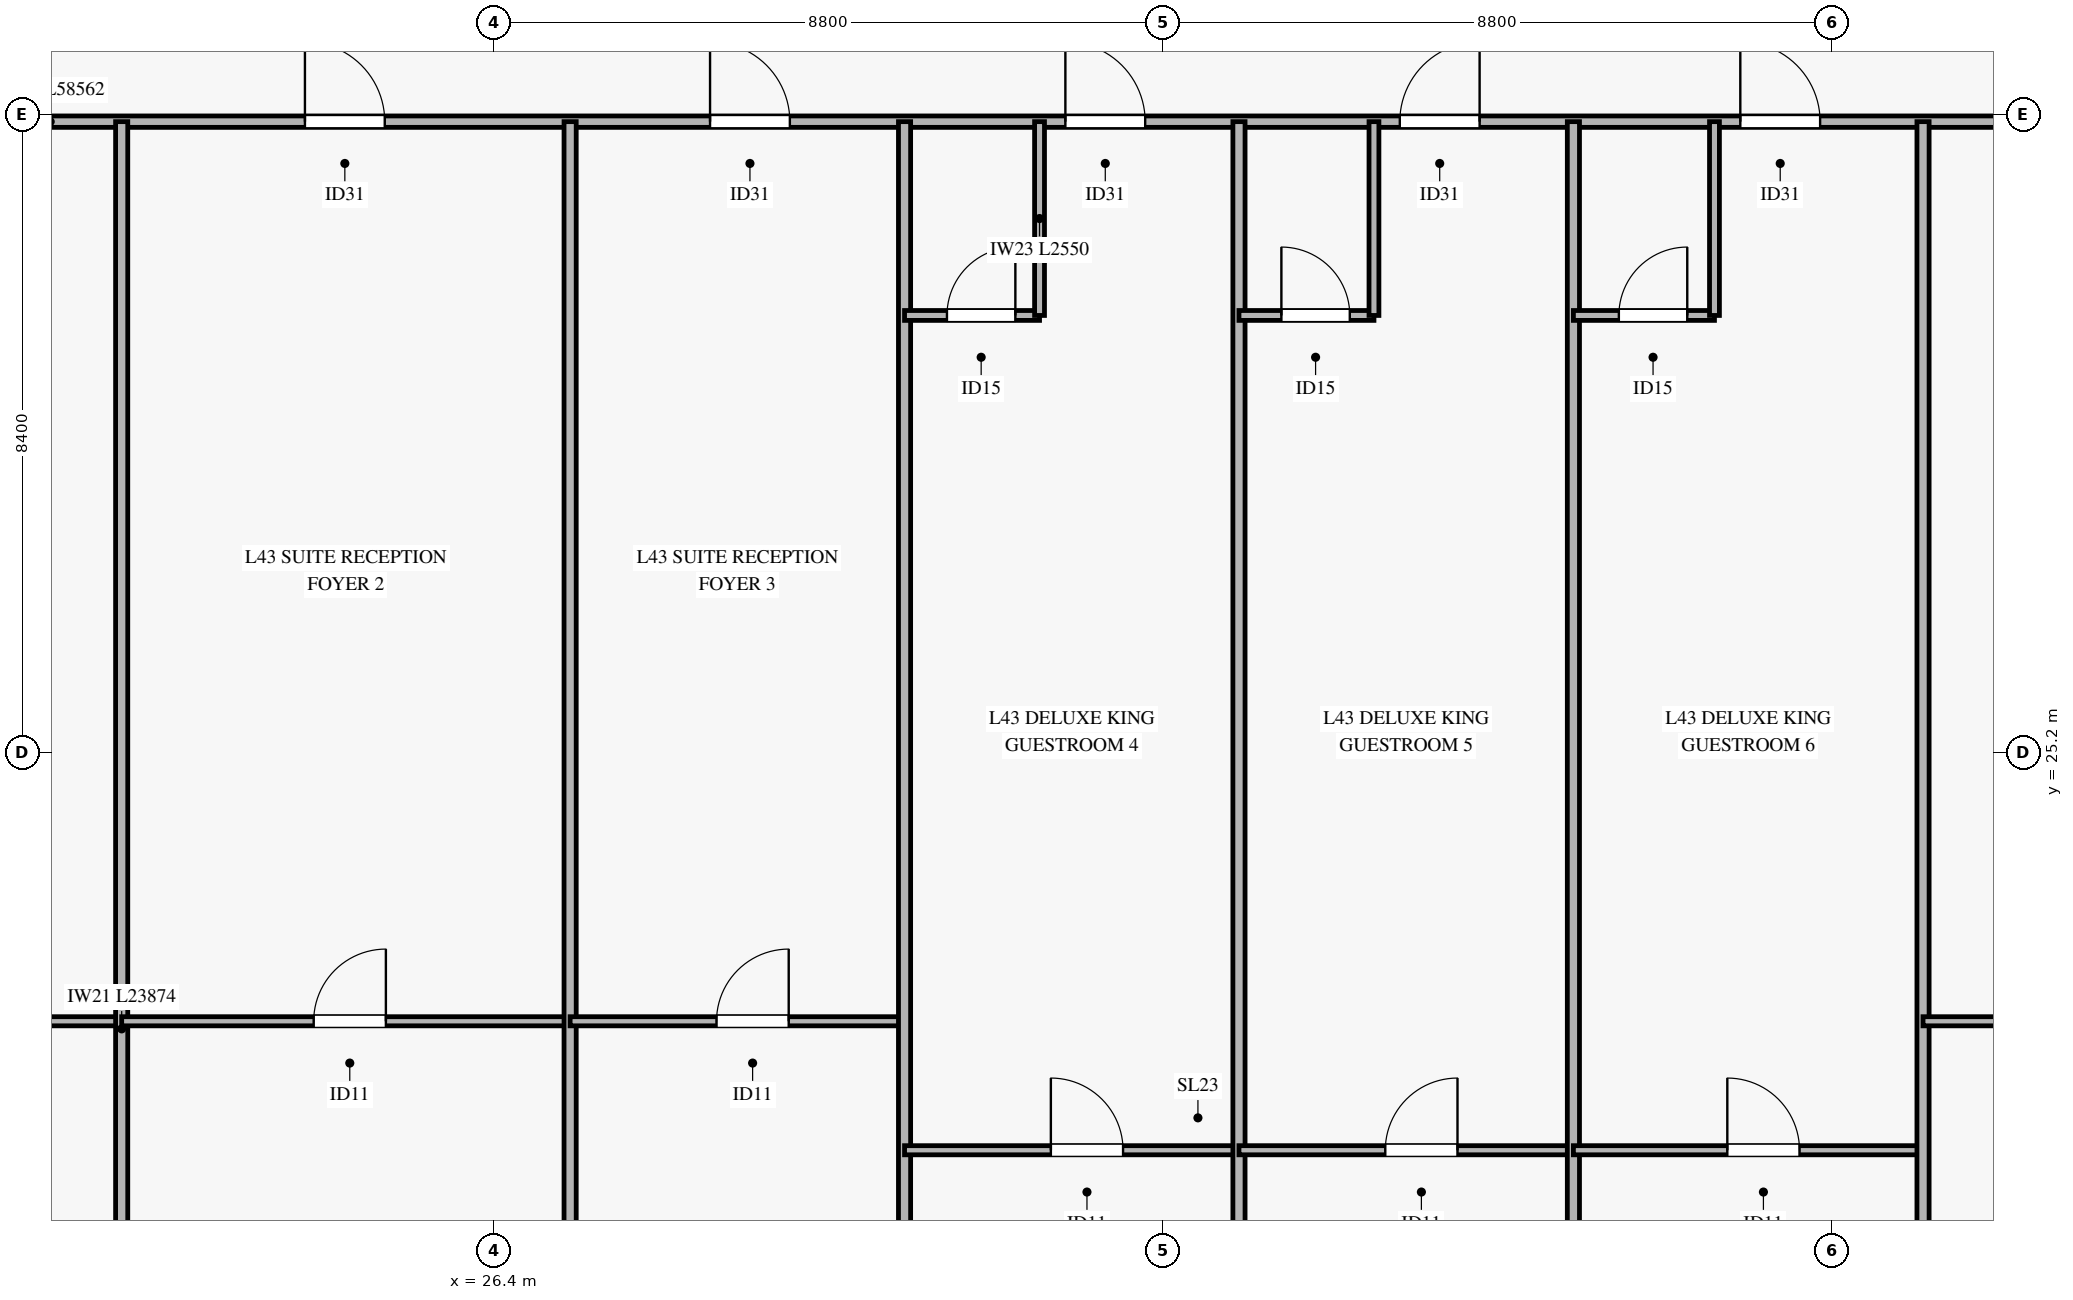
"""IFC4 building model, lengths in metres.
Left out: names, types, materials, properties, quantities, classifications, styles, units other than length and angle.
Written with IfcOpenShell. Run it as: python <this file> out.ifc"""

import sys

from ifc_helpers import new_model, si_unit, direction, frame, frame_2d, origin, place, context, subcontext, project, spatial, rectangle, extrude, source, transform, mapped, element, fill, save


model = new_model("IFC4")
c1 = context("Model", 3, precision=1e-05, world=origin(), true_north=direction((0.0, 1.0)))
c2 = subcontext(c1, "Body", "Model", "MODEL_VIEW")
j1 = project(units=[si_unit("LENGTHUNIT", "METRE"), si_unit("PLANEANGLEUNIT", "RADIAN")], contexts=[c1])
p1 = place(None, origin())
s1 = spatial("IfcSite", under=j1, at=p1, CompositionType="ELEMENT")
p2 = place(p1, origin())
s2 = spatial("IfcBuilding", under=s1, at=p2, CompositionType="ELEMENT")
p3 = place(p2, frame((0.0, 0.0, 173.7)))
s3 = spatial("IfcBuildingStorey", under=s2, at=p3, CompositionType="ELEMENT", Elevation=173.7)
p4 = place(p3, frame((5.919, 33.5, 0.0), z_axis=(0.0, 0.0, 1.0), x_axis=(1.0, 0.0, 0.0)))
e1 = element("IfcWall", 1, at=p4, inside=s3, PredefinedType="PARTITIONING", context=c2, shape_type="SweptSolid", body=[
    extrude(rectangle(XDim=58.562, YDim=0.15, at=frame_2d((29.281, 0.0))), origin(), (0.0, 0.0, 1.0), 2.455),
])
p5 = place(p4, frame((6.214, 0.0, 0.0)))
e2 = element("IfcOpeningElement", 2, at=p5, cuts=e1, PredefinedType="OPENING", context=c2, shape_type="SweptSolid", body=[
    extrude(rectangle(XDim=1.05, YDim=2.15, at=frame_2d((0.525, 1.075))), frame((0.0, 0.085, 0.0), z_axis=(0.0, -1.0, 0.0), x_axis=(1.0, 0.0, 0.0)), (0.0, 0.0, 1.0), 0.17),
])
p6 = place(p4, frame((17.992, 0.0, 0.0)))
e3 = element("IfcOpeningElement", 3, at=p6, cuts=e1, PredefinedType="OPENING", context=c2, shape_type="SweptSolid", body=[
    extrude(rectangle(XDim=1.05, YDim=2.15, at=frame_2d((0.525, 1.075))), frame((0.0, 0.085, 0.0), z_axis=(0.0, -1.0, 0.0), x_axis=(1.0, 0.0, 0.0)), (0.0, 0.0, 1.0), 0.17),
])
p7 = place(p4, frame((23.322, 0.0, 0.0)))
e4 = element("IfcOpeningElement", 4, at=p7, cuts=e1, PredefinedType="OPENING", context=c2, shape_type="SweptSolid", body=[
    extrude(rectangle(XDim=1.05, YDim=2.15, at=frame_2d((0.525, 1.075))), frame((0.0, 0.085, 0.0), z_axis=(0.0, -1.0, 0.0), x_axis=(1.0, 0.0, 0.0)), (0.0, 0.0, 1.0), 0.17),
])
p8 = place(p4, frame((27.997, 0.0, 0.0)))
e5 = element("IfcOpeningElement", 5, at=p8, cuts=e1, PredefinedType="OPENING", context=c2, shape_type="SweptSolid", body=[
    extrude(rectangle(XDim=1.05, YDim=2.15, at=frame_2d((0.525, 1.075))), frame((0.0, 0.085, 0.0), z_axis=(0.0, -1.0, 0.0), x_axis=(1.0, 0.0, 0.0)), (0.0, 0.0, 1.0), 0.17),
])
p9 = place(p4, frame((32.397, 0.0, 0.0)))
e6 = element("IfcOpeningElement", 6, at=p9, cuts=e1, PredefinedType="OPENING", context=c2, shape_type="SweptSolid", body=[
    extrude(rectangle(XDim=1.05, YDim=2.15, at=frame_2d((0.525, 1.075))), frame((0.0, 0.085, 0.0), z_axis=(0.0, -1.0, 0.0), x_axis=(1.0, 0.0, 0.0)), (0.0, 0.0, 1.0), 0.17),
])
p10 = place(p4, frame((36.877, 0.0, 0.0)))
e7 = element("IfcOpeningElement", 7, at=p10, cuts=e1, PredefinedType="OPENING", context=c2, shape_type="SweptSolid", body=[
    extrude(rectangle(XDim=1.05, YDim=2.15, at=frame_2d((0.525, 1.075))), frame((0.0, 0.085, 0.0), z_axis=(0.0, -1.0, 0.0), x_axis=(1.0, 0.0, 0.0)), (0.0, 0.0, 1.0), 0.17),
])
p11 = place(p4, frame((46.701, 0.0, 0.0)))
e8 = element("IfcOpeningElement", 8, at=p11, cuts=e1, PredefinedType="OPENING", context=c2, shape_type="SweptSolid", body=[
    extrude(rectangle(XDim=1.05, YDim=2.15, at=frame_2d((0.525, 1.075))), frame((0.0, 0.085, 0.0), z_axis=(0.0, -1.0, 0.0), x_axis=(1.0, 0.0, 0.0)), (0.0, 0.0, 1.0), 0.17),
])
p12 = place(p3, frame((5.919, 21.663, 0.0), z_axis=(0.0, 0.0, 1.0), x_axis=(1.0, 0.0, 0.0)))
e9 = element("IfcWall", 9, at=p12, inside=s3, PredefinedType="PARTITIONING", context=c2, shape_type="SweptSolid", body=[
    extrude(rectangle(XDim=15.581, YDim=0.12, at=frame_2d((7.791, 0.0))), origin(), (0.0, 0.0, 1.0), 2.455),
])
p13 = place(p12, frame((6.518, 0.0, 0.0)))
e10 = element("IfcOpeningElement", 10, at=p13, cuts=e9, PredefinedType="OPENING", context=c2, shape_type="SweptSolid", body=[
    extrude(rectangle(XDim=0.95, YDim=2.1, at=frame_2d((0.475, 1.05))), frame((0.0, 0.07, 0.0), z_axis=(0.0, -1.0, 0.0), x_axis=(1.0, 0.0, 0.0)), (0.0, 0.0, 1.0), 0.14),
])
p14 = place(p3, frame((21.5, 9.626, 0.0), z_axis=(0.0, 0.0, 1.0), x_axis=(0.0, 1.0, 0.0)))
e11 = element("IfcWall", 11, at=p14, inside=s3, PredefinedType="PARTITIONING", context=c2, shape_type="SweptSolid", body=[
    extrude(rectangle(XDim=23.874, YDim=0.16, at=frame_2d((11.937, 0.0))), origin(), (0.0, 0.0, 1.0), 2.755),
])
p15 = place(p3, frame((21.5, 21.663, 0.0), z_axis=(0.0, 0.0, 1.0), x_axis=(1.0, 0.0, 0.0)))
e12 = element("IfcWall", 12, at=p15, inside=s3, PredefinedType="PARTITIONING", context=c2, shape_type="SweptSolid", body=[
    extrude(rectangle(XDim=5.9, YDim=0.12, at=frame_2d((2.95, 0.0))), origin(), (0.0, 0.0, 1.0), 3.27),
])
p16 = place(p15, frame((2.526, 0.0, 0.0)))
e13 = element("IfcOpeningElement", 13, at=p16, cuts=e12, PredefinedType="OPENING", context=c2, shape_type="SweptSolid", body=[
    extrude(rectangle(XDim=0.95, YDim=2.1, at=frame_2d((0.475, 1.05))), frame((0.0, 0.07, 0.0), z_axis=(0.0, -1.0, 0.0), x_axis=(1.0, 0.0, 0.0)), (0.0, 0.0, 1.0), 0.14),
])
p17 = place(p3, frame((27.4, 9.626, 0.0), z_axis=(0.0, 0.0, 1.0), x_axis=(0.0, 1.0, 0.0)))
e14 = element("IfcWall", 14, at=p17, inside=s3, PredefinedType="PARTITIONING", context=c2, shape_type="SweptSolid", body=[
    extrude(rectangle(XDim=23.874, YDim=0.16, at=frame_2d((11.937, 0.0))), origin(), (0.0, 0.0, 1.0), 2.755),
])
p18 = place(p3, frame((27.4, 21.663, 0.0), z_axis=(0.0, 0.0, 1.0), x_axis=(1.0, 0.0, 0.0)))
e15 = element("IfcWall", 15, at=p18, inside=s3, PredefinedType="PARTITIONING", context=c2, shape_type="SweptSolid", body=[
    extrude(rectangle(XDim=4.4, YDim=0.12, at=frame_2d((2.2, 0.0))), origin(), (0.0, 0.0, 1.0), 2.455),
])
p19 = place(p18, frame((1.926, 0.0, 0.0)))
e16 = element("IfcOpeningElement", 16, at=p19, cuts=e15, PredefinedType="OPENING", context=c2, shape_type="SweptSolid", body=[
    extrude(rectangle(XDim=0.95, YDim=2.1, at=frame_2d((0.475, 1.05))), frame((0.0, 0.07, 0.0), z_axis=(0.0, -1.0, 0.0), x_axis=(1.0, 0.0, 0.0)), (0.0, 0.0, 1.0), 0.14),
])
p20 = place(p3, frame((31.8, 9.626, 0.0), z_axis=(0.0, 0.0, 1.0), x_axis=(0.0, 1.0, 0.0)))
e17 = element("IfcWall", 17, at=p20, inside=s3, PredefinedType="PARTITIONING", context=c2, shape_type="SweptSolid", body=[
    extrude(rectangle(XDim=23.874, YDim=0.16, at=frame_2d((11.937, 0.0))), origin(), (0.0, 0.0, 1.0), 2.755),
])
p21 = place(p3, frame((31.8, 30.95, 0.0), z_axis=(0.0, 0.0, 1.0), x_axis=(1.0, 0.0, 0.0)))
e18 = element("IfcWall", 18, at=p21, inside=s3, PredefinedType="PARTITIONING", context=c2, shape_type="SweptSolid", body=[
    extrude(rectangle(XDim=1.776, YDim=0.13, at=frame_2d((0.888, 0.0))), origin(), (0.0, 0.0, 1.0), 3.27),
])
p22 = place(p21, frame((0.558, 0.0, 0.0)))
e19 = element("IfcOpeningElement", 19, at=p22, cuts=e18, PredefinedType="OPENING", context=c2, shape_type="SweptSolid", body=[
    extrude(rectangle(XDim=0.9, YDim=2.1, at=frame_2d((0.45, 1.05))), frame((0.0, 0.075, 0.0), z_axis=(0.0, -1.0, 0.0), x_axis=(1.0, 0.0, 0.0)), (0.0, 0.0, 1.0), 0.15),
])
p23 = place(p3, frame((33.576, 30.95, 0.0), z_axis=(0.0, 0.0, 1.0), x_axis=(0.0, 1.0, 0.0)))
e20 = element("IfcWall", 20, at=p23, inside=s3, PredefinedType="PARTITIONING", context=c2, shape_type="SweptSolid", body=[
    extrude(rectangle(XDim=2.55, YDim=0.13, at=frame_2d((1.275, 0.0))), origin(), (0.0, 0.0, 1.0), 2.805),
])
p24 = place(p3, frame((31.8, 19.966, 0.0), z_axis=(0.0, 0.0, 1.0), x_axis=(1.0, 0.0, 0.0)))
e21 = element("IfcWall", 21, at=p24, inside=s3, PredefinedType="PARTITIONING", context=c2, shape_type="SweptSolid", body=[
    extrude(rectangle(XDim=4.4, YDim=0.12, at=frame_2d((2.2, 0.0))), origin(), (0.0, 0.0, 1.0), 3.27),
])
p25 = place(p24, frame((1.925, 0.0, 0.0)))
e22 = element("IfcOpeningElement", 22, at=p25, cuts=e21, PredefinedType="OPENING", context=c2, shape_type="SweptSolid", body=[
    extrude(rectangle(XDim=0.95, YDim=2.1, at=frame_2d((0.475, 1.05))), frame((0.0, 0.07, 0.0), z_axis=(0.0, -1.0, 0.0), x_axis=(1.0, 0.0, 0.0)), (0.0, 0.0, 1.0), 0.14),
])
p26 = place(p3, frame((36.2, 9.626, 0.0), z_axis=(0.0, 0.0, 1.0), x_axis=(0.0, 1.0, 0.0)))
e23 = element("IfcWall", 23, at=p26, inside=s3, PredefinedType="PARTITIONING", context=c2, shape_type="SweptSolid", body=[
    extrude(rectangle(XDim=23.874, YDim=0.16, at=frame_2d((11.937, 0.0))), origin(), (0.0, 0.0, 1.0), 2.755),
])
p27 = place(p3, frame((36.2, 30.95, 0.0), z_axis=(0.0, 0.0, 1.0), x_axis=(1.0, 0.0, 0.0)))
e24 = element("IfcWall", 24, at=p27, inside=s3, PredefinedType="PARTITIONING", context=c2, shape_type="SweptSolid", body=[
    extrude(rectangle(XDim=1.776, YDim=0.13, at=frame_2d((0.888, 0.0))), origin(), (0.0, 0.0, 1.0), 2.455),
])
p28 = place(p27, frame((0.558, 0.0, 0.0)))
e25 = element("IfcOpeningElement", 25, at=p28, cuts=e24, PredefinedType="OPENING", context=c2, shape_type="SweptSolid", body=[
    extrude(rectangle(XDim=0.9, YDim=2.1, at=frame_2d((0.45, 1.05))), frame((0.0, 0.075, 0.0), z_axis=(0.0, -1.0, 0.0), x_axis=(1.0, 0.0, 0.0)), (0.0, 0.0, 1.0), 0.15),
])
p29 = place(p3, frame((37.976, 30.95, 0.0), z_axis=(0.0, 0.0, 1.0), x_axis=(0.0, 1.0, 0.0)))
e26 = element("IfcWall", 26, at=p29, inside=s3, PredefinedType="PARTITIONING", context=c2, shape_type="SweptSolid", body=[
    extrude(rectangle(XDim=2.55, YDim=0.13, at=frame_2d((1.275, 0.0))), origin(), (0.0, 0.0, 1.0), 2.805),
])
p30 = place(p3, frame((36.2, 19.966, 0.0), z_axis=(0.0, 0.0, 1.0), x_axis=(1.0, 0.0, 0.0)))
e27 = element("IfcWall", 27, at=p30, inside=s3, PredefinedType="PARTITIONING", context=c2, shape_type="SweptSolid", body=[
    extrude(rectangle(XDim=4.4, YDim=0.12, at=frame_2d((2.2, 0.0))), origin(), (0.0, 0.0, 1.0), 2.455),
])
p31 = place(p30, frame((1.925, 0.0, 0.0)))
e28 = element("IfcOpeningElement", 28, at=p31, cuts=e27, PredefinedType="OPENING", context=c2, shape_type="SweptSolid", body=[
    extrude(rectangle(XDim=0.95, YDim=2.1, at=frame_2d((0.475, 1.05))), frame((0.0, 0.07, 0.0), z_axis=(0.0, -1.0, 0.0), x_axis=(1.0, 0.0, 0.0)), (0.0, 0.0, 1.0), 0.14),
])
p32 = place(p3, frame((40.6, 9.626, 0.0), z_axis=(0.0, 0.0, 1.0), x_axis=(0.0, 1.0, 0.0)))
e29 = element("IfcWall", 29, at=p32, inside=s3, PredefinedType="PARTITIONING", context=c2, shape_type="SweptSolid", body=[
    extrude(rectangle(XDim=23.874, YDim=0.16, at=frame_2d((11.937, 0.0))), origin(), (0.0, 0.0, 1.0), 2.755),
])
p33 = place(p3, frame((40.6, 30.95, 0.0), z_axis=(0.0, 0.0, 1.0), x_axis=(1.0, 0.0, 0.0)))
e30 = element("IfcWall", 30, at=p33, inside=s3, PredefinedType="PARTITIONING", context=c2, shape_type="SweptSolid", body=[
    extrude(rectangle(XDim=1.856, YDim=0.13, at=frame_2d((0.928, 0.0))), origin(), (0.0, 0.0, 1.0), 3.27),
])
p34 = place(p33, frame((0.598, 0.0, 0.0)))
e31 = element("IfcOpeningElement", 31, at=p34, cuts=e30, PredefinedType="OPENING", context=c2, shape_type="SweptSolid", body=[
    extrude(rectangle(XDim=0.9, YDim=2.1, at=frame_2d((0.45, 1.05))), frame((0.0, 0.075, 0.0), z_axis=(0.0, -1.0, 0.0), x_axis=(1.0, 0.0, 0.0)), (0.0, 0.0, 1.0), 0.15),
])
p35 = place(p3, frame((42.456, 30.95, 0.0), z_axis=(0.0, 0.0, 1.0), x_axis=(0.0, 1.0, 0.0)))
e32 = element("IfcWall", 32, at=p35, inside=s3, PredefinedType="PARTITIONING", context=c2, shape_type="SweptSolid", body=[
    extrude(rectangle(XDim=2.55, YDim=0.13, at=frame_2d((1.275, 0.0))), origin(), (0.0, 0.0, 1.0), 2.805),
])
p36 = place(p3, frame((40.6, 19.966, 0.0), z_axis=(0.0, 0.0, 1.0), x_axis=(1.0, 0.0, 0.0)))
e33 = element("IfcWall", 33, at=p36, inside=s3, PredefinedType="PARTITIONING", context=c2, shape_type="SweptSolid", body=[
    extrude(rectangle(XDim=4.6, YDim=0.12, at=frame_2d((2.3, 0.0))), origin(), (0.0, 0.0, 1.0), 2.455),
])
p37 = place(p36, frame((2.025, 0.0, 0.0)))
e34 = element("IfcOpeningElement", 34, at=p37, cuts=e33, PredefinedType="OPENING", context=c2, shape_type="SweptSolid", body=[
    extrude(rectangle(XDim=0.95, YDim=2.1, at=frame_2d((0.475, 1.05))), frame((0.0, 0.07, 0.0), z_axis=(0.0, -1.0, 0.0), x_axis=(1.0, 0.0, 0.0)), (0.0, 0.0, 1.0), 0.14),
])
p38 = place(p3, frame((45.2, 9.626, 0.0), z_axis=(0.0, 0.0, 1.0), x_axis=(0.0, 1.0, 0.0)))
e35 = element("IfcWall", 35, at=p38, inside=s3, PredefinedType="PARTITIONING", context=c2, shape_type="SweptSolid", body=[
    extrude(rectangle(XDim=23.874, YDim=0.16, at=frame_2d((11.937, 0.0))), origin(), (0.0, 0.0, 1.0), 2.755),
])
p39 = place(p3, frame((45.2, 21.663, 0.0), z_axis=(0.0, 0.0, 1.0), x_axis=(1.0, 0.0, 0.0)))
e36 = element("IfcWall", 36, at=p39, inside=s3, PredefinedType="PARTITIONING", context=c2, shape_type="SweptSolid", body=[
    extrude(rectangle(XDim=19.281, YDim=0.12, at=frame_2d((9.641, 0.0))), origin(), (0.0, 0.0, 1.0), 2.455),
])
p40 = place(p39, frame((7.798, 0.0, 0.0)))
e37 = element("IfcOpeningElement", 37, at=p40, cuts=e36, PredefinedType="OPENING", context=c2, shape_type="SweptSolid", body=[
    extrude(rectangle(XDim=0.95, YDim=2.1, at=frame_2d((0.475, 1.05))), frame((0.0, 0.07, 0.0), z_axis=(0.0, -1.0, 0.0), x_axis=(1.0, 0.0, 0.0)), (0.0, 0.0, 1.0), 0.14),
])
m1 = source(origin(), c2, "Body", "SweptSolid", [
    extrude(rectangle(XDim=1.05, YDim=2.15, at=frame_2d((0.525, 1.075))), frame((0.0, 0.025, 0.0), z_axis=(0.0, -1.0, 0.0), x_axis=(1.0, 0.0, 0.0)), (0.0, 0.0, 1.0), 0.05),
])
p41 = place(p6, origin())
e38 = element("IfcDoor", 38, at=p41, inside=s3, OperationType="SINGLE_SWING_LEFT", PredefinedType="DOOR", context=c2, shape_type="MappedRepresentation", body=[
    mapped(m1, transform((0.0, 0.0, 0.0), x_axis=(1.0, 0.0, 0.0), y_axis=(0.0, 1.0, 0.0), z_axis=(0.0, 0.0, 1.0), scale=1.0)),
])
fill(e3, e38)
m2 = source(origin(), c2, "Body", "SweptSolid", [
    extrude(rectangle(XDim=0.95, YDim=2.1, at=frame_2d((0.475, 1.05))), frame((0.0, 0.025, 0.0), z_axis=(0.0, -1.0, 0.0), x_axis=(1.0, 0.0, 0.0)), (0.0, 0.0, 1.0), 0.05),
])
p42 = place(p16, origin())
e39 = element("IfcDoor", 39, at=p42, inside=s3, OperationType="SINGLE_SWING_RIGHT", PredefinedType="DOOR", context=c2, shape_type="MappedRepresentation", body=[
    mapped(m2, transform((0.0, 0.0, 0.0), x_axis=(1.0, 0.0, 0.0), y_axis=(0.0, 1.0, 0.0), z_axis=(0.0, 0.0, 1.0), scale=1.0)),
])
fill(e13, e39)
p43 = place(p7, origin())
e40 = element("IfcDoor", 40, at=p43, inside=s3, OperationType="SINGLE_SWING_LEFT", PredefinedType="DOOR", context=c2, shape_type="MappedRepresentation", body=[
    mapped(m1, transform((0.0, 0.0, 0.0), x_axis=(1.0, 0.0, 0.0), y_axis=(0.0, 1.0, 0.0), z_axis=(0.0, 0.0, 1.0), scale=1.0)),
])
fill(e4, e40)
p44 = place(p19, origin())
e41 = element("IfcDoor", 41, at=p44, inside=s3, OperationType="SINGLE_SWING_RIGHT", PredefinedType="DOOR", context=c2, shape_type="MappedRepresentation", body=[
    mapped(m2, transform((0.0, 0.0, 0.0), x_axis=(1.0, 0.0, 0.0), y_axis=(0.0, 1.0, 0.0), z_axis=(0.0, 0.0, 1.0), scale=1.0)),
])
fill(e16, e41)
p45 = place(p8, origin())
e42 = element("IfcDoor", 42, at=p45, inside=s3, OperationType="SINGLE_SWING_LEFT", PredefinedType="DOOR", context=c2, shape_type="MappedRepresentation", body=[
    mapped(m1, transform((0.0, 0.0, 0.0), x_axis=(1.0, 0.0, 0.0), y_axis=(0.0, 1.0, 0.0), z_axis=(0.0, 0.0, 1.0), scale=1.0)),
])
fill(e5, e42)
m3 = source(origin(), c2, "Body", "SweptSolid", [
    extrude(rectangle(XDim=0.9, YDim=2.1, at=frame_2d((0.45, 1.05))), frame((0.0, 0.025, 0.0), z_axis=(0.0, -1.0, 0.0), x_axis=(1.0, 0.0, 0.0)), (0.0, 0.0, 1.0), 0.05),
])
p46 = place(p22, origin())
e43 = element("IfcDoor", 43, at=p46, inside=s3, OperationType="SINGLE_SWING_RIGHT", PredefinedType="DOOR", context=c2, shape_type="MappedRepresentation", body=[
    mapped(m3, transform((0.0, 0.0, 0.0), x_axis=(1.0, 0.0, 0.0), y_axis=(0.0, 1.0, 0.0), z_axis=(0.0, 0.0, 1.0), scale=1.0)),
])
fill(e19, e43)
p47 = place(p25, origin())
e44 = element("IfcDoor", 44, at=p47, inside=s3, OperationType="SINGLE_SWING_LEFT", PredefinedType="DOOR", context=c2, shape_type="MappedRepresentation", body=[
    mapped(m2, transform((0.0, 0.0, 0.0), x_axis=(1.0, 0.0, 0.0), y_axis=(0.0, 1.0, 0.0), z_axis=(0.0, 0.0, 1.0), scale=1.0)),
])
fill(e22, e44)
p48 = place(p9, origin())
e45 = element("IfcDoor", 45, at=p48, inside=s3, OperationType="SINGLE_SWING_RIGHT", PredefinedType="DOOR", context=c2, shape_type="MappedRepresentation", body=[
    mapped(m1, transform((0.0, 0.0, 0.0), x_axis=(1.0, 0.0, 0.0), y_axis=(0.0, 1.0, 0.0), z_axis=(0.0, 0.0, 1.0), scale=1.0)),
])
fill(e6, e45)
p49 = place(p28, origin())
e46 = element("IfcDoor", 46, at=p49, inside=s3, OperationType="SINGLE_SWING_LEFT", PredefinedType="DOOR", context=c2, shape_type="MappedRepresentation", body=[
    mapped(m3, transform((0.0, 0.0, 0.0), x_axis=(1.0, 0.0, 0.0), y_axis=(0.0, 1.0, 0.0), z_axis=(0.0, 0.0, 1.0), scale=1.0)),
])
fill(e25, e46)
p50 = place(p31, origin())
e47 = element("IfcDoor", 47, at=p50, inside=s3, OperationType="SINGLE_SWING_RIGHT", PredefinedType="DOOR", context=c2, shape_type="MappedRepresentation", body=[
    mapped(m2, transform((0.0, 0.0, 0.0), x_axis=(1.0, 0.0, 0.0), y_axis=(0.0, 1.0, 0.0), z_axis=(0.0, 0.0, 1.0), scale=1.0)),
])
fill(e28, e47)
p51 = place(p10, origin())
e48 = element("IfcDoor", 48, at=p51, inside=s3, OperationType="SINGLE_SWING_LEFT", PredefinedType="DOOR", context=c2, shape_type="MappedRepresentation", body=[
    mapped(m1, transform((0.0, 0.0, 0.0), x_axis=(1.0, 0.0, 0.0), y_axis=(0.0, 1.0, 0.0), z_axis=(0.0, 0.0, 1.0), scale=1.0)),
])
fill(e7, e48)
p52 = place(p34, origin())
e49 = element("IfcDoor", 49, at=p52, inside=s3, OperationType="SINGLE_SWING_RIGHT", PredefinedType="DOOR", context=c2, shape_type="MappedRepresentation", body=[
    mapped(m3, transform((0.0, 0.0, 0.0), x_axis=(1.0, 0.0, 0.0), y_axis=(0.0, 1.0, 0.0), z_axis=(0.0, 0.0, 1.0), scale=1.0)),
])
fill(e31, e49)
p53 = place(p37, origin())
e50 = element("IfcDoor", 50, at=p53, inside=s3, OperationType="SINGLE_SWING_LEFT", PredefinedType="DOOR", context=c2, shape_type="MappedRepresentation", body=[
    mapped(m2, transform((0.0, 0.0, 0.0), x_axis=(1.0, 0.0, 0.0), y_axis=(0.0, 1.0, 0.0), z_axis=(0.0, 0.0, 1.0), scale=1.0)),
])
fill(e34, e50)
save(model, sys.argv[1])
